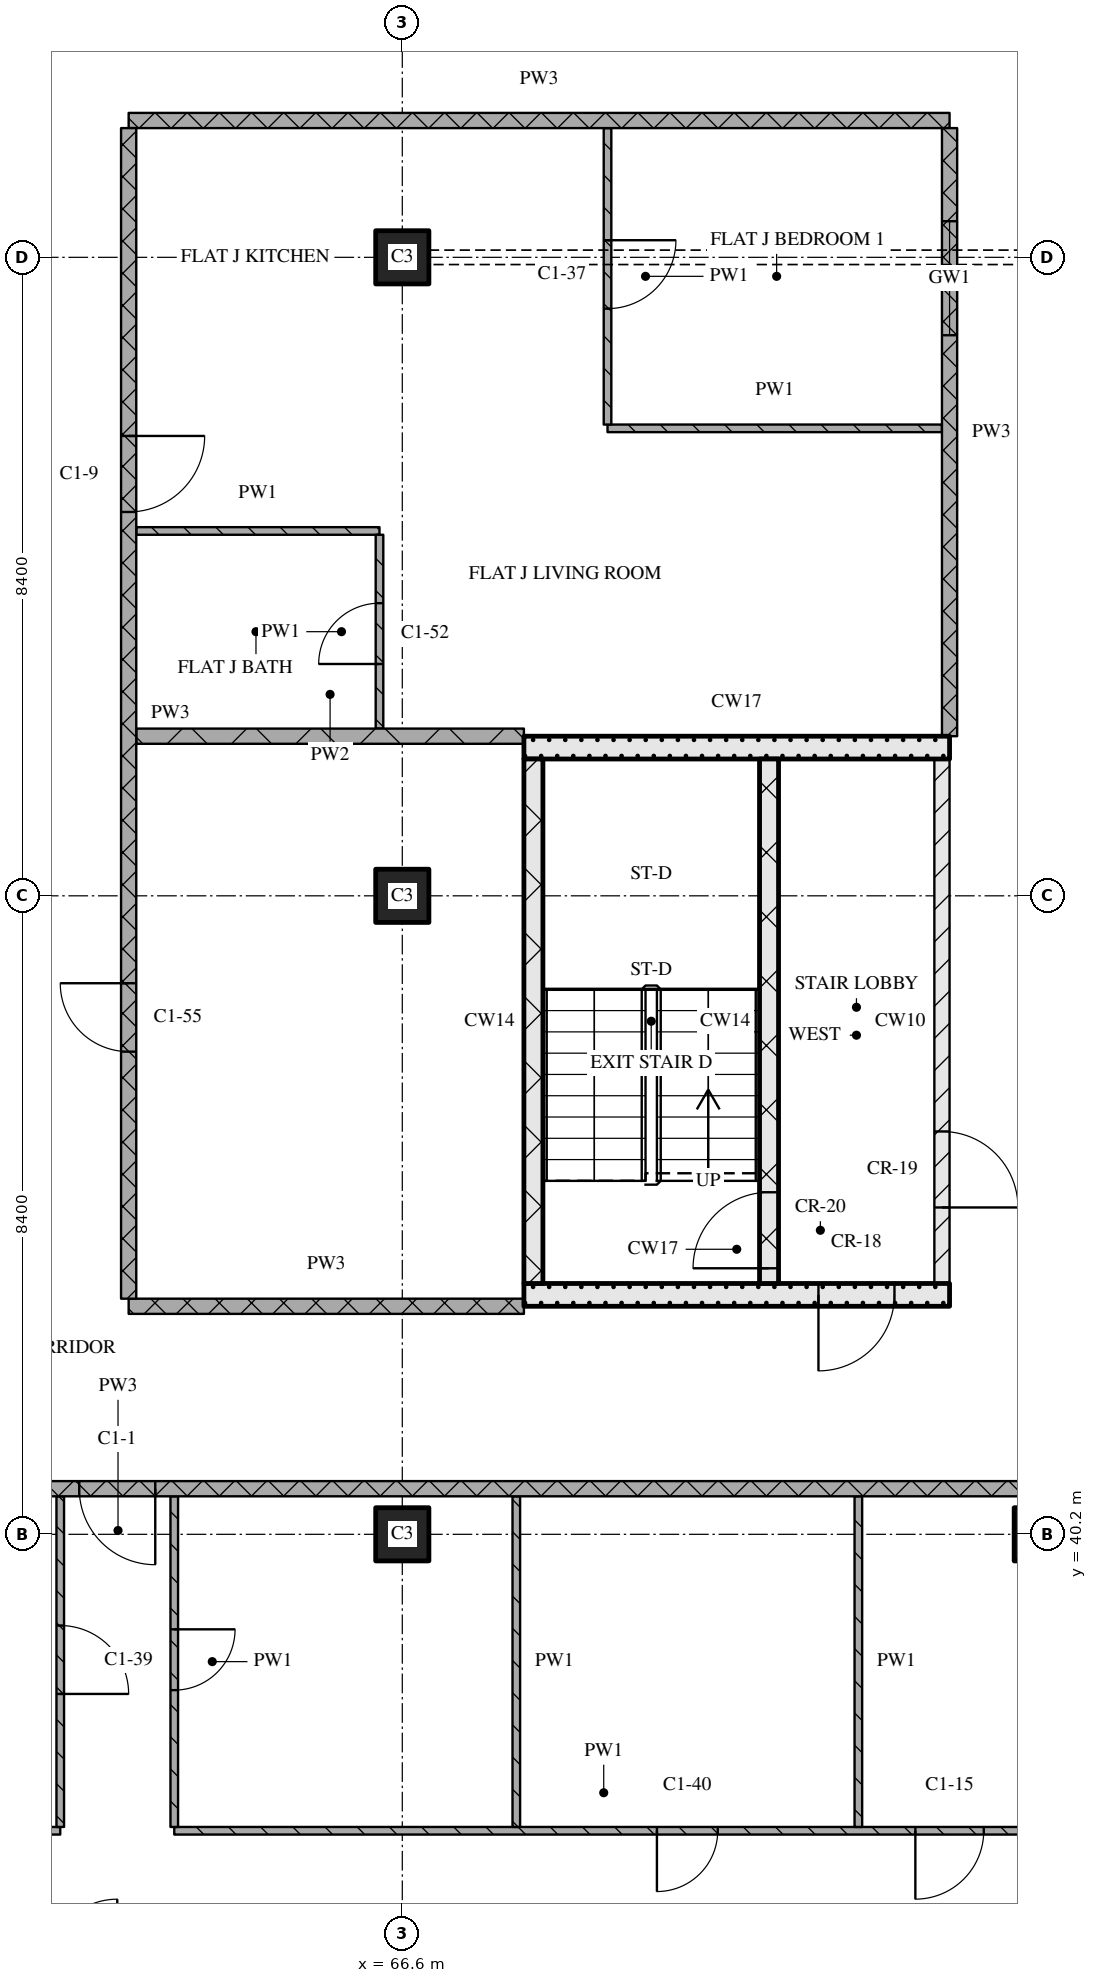
"""IFC4 building model, lengths in metres.
Left out: names, types, materials, properties, quantities, classifications, styles, units other than length and angle.
Written with IfcOpenShell. Run it as: python <this file> out.ifc"""

import sys

from ifc_helpers import new_model, si_unit, direction, frame, frame_2d, origin, origin_2d, place, context, subcontext, project, spatial, rectangle, extrude, element, fill, save


model = new_model("IFC4")
c1 = context("Model", 3, precision=1e-05, world=origin(), true_north=direction((0.0, 1.0)))
c2 = subcontext(c1, "Body", "Model", "MODEL_VIEW")
j1 = project(units=[si_unit("LENGTHUNIT", "METRE"), si_unit("PLANEANGLEUNIT", "RADIAN")], contexts=[c1])
p1 = place(None, origin())
s1 = spatial("IfcSite", under=j1, at=p1, CompositionType="ELEMENT")
p2 = place(p1, origin())
s2 = spatial("IfcBuilding", under=s1, at=p2, CompositionType="ELEMENT")
p3 = place(p2, frame((0.0, 0.0, 147.45)))
s3 = spatial("IfcBuildingStorey", under=s2, at=p3, CompositionType="ELEMENT", Elevation=147.45)
for number, where, z_axis, x_axis in (
    (1, (66.6, 40.2, 0.0), (0.0, 0.0, 1.0), (1.0, 0.0, 0.0)),
    (2, (66.6, 48.6, 0.0), (0.0, 0.0, 1.0), (1.0, 0.0, 0.0)),
    (3, (66.6, 57.0, 0.0), (0.0, 0.0, 1.0), (1.0, 0.0, 0.0)),
    (4, (75.0, 40.2, 0.0), (0.0, 0.0, 1.0), (1.0, 0.0, 0.0)),
):
    element("IfcColumn", number, at=place(p3, frame(where, z_axis=z_axis, x_axis=x_axis)), inside=s3, PredefinedType="COLUMN", context=c2, shape_type="SweptSolid", body=[
        extrude(rectangle(XDim=0.7, YDim=0.7, at=origin_2d()), origin(), (0.0, 0.0, 1.0), 3.6),
    ])
p4 = place(p3, frame((68.2, 43.35, 0.0), z_axis=(0.0, 0.0, 1.0), x_axis=(1.0, 0.0, 0.0)))
e5 = element("IfcWall", 5, at=p4, inside=s3, PredefinedType="SOLIDWALL", context=c2, shape_type="SweptSolid", body=[
    extrude(rectangle(XDim=5.6, YDim=0.3, at=frame_2d((2.8, 0.0))), origin(), (0.0, 0.0, 1.0), 3.32),
])
p5 = place(p4, frame((3.875, 0.0, 0.0)))
e6 = element("IfcOpeningElement", 6, at=p5, cuts=e5, PredefinedType="OPENING", context=c2, shape_type="SweptSolid", body=[
    extrude(rectangle(XDim=1.0, YDim=2.1, at=frame_2d((0.5, 1.05))), frame((0.0, 0.16, 0.0), z_axis=(0.0, -1.0, 0.0), x_axis=(1.0, 0.0, 0.0)), (0.0, 0.0, 1.0), 0.32),
])
p6 = place(p3, frame((68.325, 43.5, 0.0), z_axis=(0.0, 0.0, 1.0), x_axis=(0.0, 1.0, 0.0)))
e7 = element("IfcWall", 7, at=p6, inside=s3, PredefinedType="SOLIDWALL", context=c2, shape_type="SweptSolid", body=[
    extrude(rectangle(XDim=6.9, YDim=0.25, at=frame_2d((3.45, 0.0))), origin(), (0.0, 0.0, 1.0), 3.32),
])
p7 = place(p3, frame((71.425, 43.5, 0.0), z_axis=(0.0, 0.0, 1.0), x_axis=(0.0, 1.0, 0.0)))
e8 = element("IfcWall", 8, at=p7, inside=s3, PredefinedType="SOLIDWALL", context=c2, shape_type="SweptSolid", body=[
    extrude(rectangle(XDim=6.9, YDim=0.25, at=frame_2d((3.45, 0.0))), origin(), (0.0, 0.0, 1.0), 3.32),
])
p8 = place(p7, frame((0.2, 0.0, 0.0)))
e9 = element("IfcOpeningElement", 9, at=p8, cuts=e8, PredefinedType="OPENING", context=c2, shape_type="SweptSolid", body=[
    extrude(rectangle(XDim=1.0, YDim=2.1, at=frame_2d((0.5, 1.05))), frame((0.0, 0.135, 0.0), z_axis=(0.0, -1.0, 0.0), x_axis=(1.0, 0.0, 0.0)), (0.0, 0.0, 1.0), 0.27),
])
p9 = place(p3, frame((73.7, 43.5, 0.0), z_axis=(0.0, 0.0, 1.0), x_axis=(0.0, 1.0, 0.0)))
e10 = element("IfcWall", 10, at=p9, inside=s3, PredefinedType="PARTITIONING", context=c2, shape_type="SweptSolid", body=[
    extrude(rectangle(XDim=6.9, YDim=0.2, at=frame_2d((3.45, 0.0))), origin(), (0.0, 0.0, 1.0), 3.32),
])
p10 = place(p9, frame((1.0, 0.0, 0.0)))
e11 = element("IfcOpeningElement", 11, at=p10, cuts=e10, PredefinedType="OPENING", context=c2, shape_type="SweptSolid", body=[
    extrude(rectangle(XDim=1.0, YDim=2.1, at=frame_2d((0.5, 1.05))), frame((0.0, 0.11, 0.0), z_axis=(0.0, -1.0, 0.0), x_axis=(1.0, 0.0, 0.0)), (0.0, 0.0, 1.0), 0.22),
])
p11 = place(p3, frame((68.2, 50.55, 0.0), z_axis=(0.0, 0.0, 1.0), x_axis=(1.0, 0.0, 0.0)))
e12 = element("IfcWall", 12, at=p11, inside=s3, PredefinedType="SOLIDWALL", context=c2, shape_type="SweptSolid", body=[
    extrude(rectangle(XDim=5.6, YDim=0.3, at=frame_2d((2.8, 0.0))), origin(), (0.0, 0.0, 1.0), 3.32),
])
p12 = place(p3, frame((55.5, 36.3, 0.0), z_axis=(0.0, 0.0, 1.0), x_axis=(1.0, 0.0, 0.0)))
e13 = element("IfcWall", 13, at=p12, inside=s3, PredefinedType="PARTITIONING", context=c2, shape_type="SweptSolid", body=[
    extrude(rectangle(XDim=6.6, YDim=0.1, at=frame_2d((3.3, 0.0))), origin(), (0.0, 0.0, 1.0), 3.32),
])
p13 = place(p3, frame((63.6, 36.3, 0.0), z_axis=(0.0, 0.0, 1.0), x_axis=(1.0, 0.0, 0.0)))
e14 = element("IfcWall", 14, at=p13, inside=s3, PredefinedType="PARTITIONING", context=c2, shape_type="SweptSolid", body=[
    extrude(rectangle(XDim=11.3, YDim=0.1, at=frame_2d((5.65, 0.0))), origin(), (0.0, 0.0, 1.0), 3.32),
])
p14 = place(p13, frame((6.35, 0.0, 0.0)))
e15 = element("IfcOpeningElement", 15, at=p14, cuts=e14, PredefinedType="OPENING", context=c2, shape_type="SweptSolid", body=[
    extrude(rectangle(XDim=0.8, YDim=2.1, at=frame_2d((0.4, 1.05))), frame((0.0, 0.06, 0.0), z_axis=(0.0, -1.0, 0.0), x_axis=(1.0, 0.0, 0.0)), (0.0, 0.0, 1.0), 0.12),
])
p15 = place(p13, frame((9.75, 0.0, 0.0)))
e16 = element("IfcOpeningElement", 16, at=p15, cuts=e14, PredefinedType="OPENING", context=c2, shape_type="SweptSolid", body=[
    extrude(rectangle(XDim=0.9, YDim=2.1, at=frame_2d((0.45, 1.05))), frame((0.0, 0.06, 0.0), z_axis=(0.0, -1.0, 0.0), x_axis=(1.0, 0.0, 0.0)), (0.0, 0.0, 1.0), 0.12),
])
p16 = place(p3, frame((75.0, 40.8, 0.0), z_axis=(0.0, 0.0, 1.0), x_axis=(-1.0, 0.0, 0.0)))
e17 = element("IfcWall", 17, at=p16, inside=s3, PredefinedType="PARTITIONING", context=c2, shape_type="SweptSolid", body=[
    extrude(rectangle(XDim=24.28, YDim=0.2, at=frame_2d((12.14, 0.0))), origin(), (0.0, 0.0, 1.0), 3.32),
])
p17 = place(p16, frame((11.65, 0.0, 0.0)))
e18 = element("IfcOpeningElement", 18, at=p17, cuts=e17, PredefinedType="OPENING", context=c2, shape_type="SweptSolid", body=[
    extrude(rectangle(XDim=1.0, YDim=2.1, at=frame_2d((0.5, 1.05))), frame((0.0, 0.11, 0.0), z_axis=(0.0, -1.0, 0.0), x_axis=(1.0, 0.0, 0.0)), (0.0, 0.0, 1.0), 0.22),
])
p18 = place(p3, frame((63.0, 43.2, 0.0), z_axis=(0.0, 0.0, 1.0), x_axis=(1.0, 0.0, 0.0)))
e19 = element("IfcWall", 19, at=p18, inside=s3, PredefinedType="PARTITIONING", context=c2, shape_type="SweptSolid", body=[
    extrude(rectangle(XDim=5.2, YDim=0.2, at=frame_2d((2.6, 0.0))), origin(), (0.0, 0.0, 1.0), 3.32),
])
p19 = place(p3, frame((63.1, 50.7, 0.0), z_axis=(0.0, 0.0, 1.0), x_axis=(1.0, 0.0, 0.0)))
e20 = element("IfcWall", 20, at=p19, inside=s3, PredefinedType="PARTITIONING", context=c2, shape_type="SweptSolid", body=[
    extrude(rectangle(XDim=5.1, YDim=0.2, at=frame_2d((2.55, 0.0))), origin(), (0.0, 0.0, 1.0), 3.32),
])
p20 = place(p3, frame((63.1, 53.4, 0.0), z_axis=(0.0, 0.0, 1.0), x_axis=(1.0, 0.0, 0.0)))
e21 = element("IfcWall", 21, at=p20, inside=s3, PredefinedType="PARTITIONING", context=c2, shape_type="SweptSolid", body=[
    extrude(rectangle(XDim=3.2, YDim=0.1, at=frame_2d((1.6, 0.0))), origin(), (0.0, 0.0, 1.0), 3.32),
])
p21 = place(p3, frame((69.3, 54.75, 0.0), z_axis=(0.0, 0.0, 1.0), x_axis=(1.0, 0.0, 0.0)))
e22 = element("IfcWall", 22, at=p21, inside=s3, PredefinedType="PARTITIONING", context=c2, shape_type="SweptSolid", body=[
    extrude(rectangle(XDim=4.4, YDim=0.1, at=frame_2d((2.2, 0.0))), origin(), (0.0, 0.0, 1.0), 3.32),
])
p22 = place(p3, frame((63.0, 58.8, 0.0), z_axis=(0.0, 0.0, 1.0), x_axis=(1.0, 0.0, 0.0)))
e23 = element("IfcWall", 23, at=p22, inside=s3, PredefinedType="PARTITIONING", context=c2, shape_type="SweptSolid", body=[
    extrude(rectangle(XDim=10.8, YDim=0.2, at=frame_2d((5.4, 0.0))), origin(), (0.0, 0.0, 1.0), 3.32),
])
p23 = place(p3, frame((62.1, 36.35, 0.0), z_axis=(0.0, 0.0, 1.0), x_axis=(0.0, 1.0, 0.0)))
e24 = element("IfcWall", 24, at=p23, inside=s3, PredefinedType="PARTITIONING", context=c2, shape_type="SweptSolid", body=[
    extrude(rectangle(XDim=4.35, YDim=0.1, at=frame_2d((2.175, 0.0))), origin(), (0.0, 0.0, 1.0), 3.32),
])
p24 = place(p23, frame((1.75, 0.0, 0.0)))
e25 = element("IfcOpeningElement", 25, at=p24, cuts=e24, PredefinedType="OPENING", context=c2, shape_type="SweptSolid", body=[
    extrude(rectangle(XDim=0.9, YDim=2.1, at=frame_2d((0.45, 1.05))), frame((0.0, 0.06, 0.0), z_axis=(0.0, -1.0, 0.0), x_axis=(1.0, 0.0, 0.0)), (0.0, 0.0, 1.0), 0.12),
])
p25 = place(p3, frame((63.0, 58.7, 0.0), z_axis=(0.0, 0.0, 1.0), x_axis=(0.0, -1.0, 0.0)))
e26 = element("IfcWall", 26, at=p25, inside=s3, PredefinedType="PARTITIONING", context=c2, shape_type="SweptSolid", body=[
    extrude(rectangle(XDim=15.4, YDim=0.2, at=frame_2d((7.7, 0.0))), origin(), (0.0, 0.0, 1.0), 3.32),
])
p26 = place(p25, frame((4.05, 0.0, 0.0)))
e27 = element("IfcOpeningElement", 27, at=p26, cuts=e26, PredefinedType="OPENING", context=c2, shape_type="SweptSolid", body=[
    extrude(rectangle(XDim=1.0, YDim=2.1, at=frame_2d((0.5, 1.05))), frame((0.0, 0.11, 0.0), z_axis=(0.0, -1.0, 0.0), x_axis=(1.0, 0.0, 0.0)), (0.0, 0.0, 1.0), 0.22),
])
p27 = place(p25, frame((11.25, 0.0, 0.0)))
e28 = element("IfcOpeningElement", 28, at=p27, cuts=e26, PredefinedType="OPENING", context=c2, shape_type="SweptSolid", body=[
    extrude(rectangle(XDim=0.9, YDim=2.1, at=frame_2d((0.45, 1.05))), frame((0.0, 0.11, 0.0), z_axis=(0.0, -1.0, 0.0), x_axis=(1.0, 0.0, 0.0)), (0.0, 0.0, 1.0), 0.22),
])
p28 = place(p3, frame((63.6, 40.7, 0.0), z_axis=(0.0, 0.0, 1.0), x_axis=(0.0, -1.0, 0.0)))
e29 = element("IfcWall", 29, at=p28, inside=s3, PredefinedType="PARTITIONING", context=c2, shape_type="SweptSolid", body=[
    extrude(rectangle(XDim=4.35, YDim=0.1, at=frame_2d((2.175, 0.0))), origin(), (0.0, 0.0, 1.0), 3.32),
])
p29 = place(p28, frame((1.75, 0.0, 0.0)))
e30 = element("IfcOpeningElement", 30, at=p29, cuts=e29, PredefinedType="OPENING", context=c2, shape_type="SweptSolid", body=[
    extrude(rectangle(XDim=0.8, YDim=2.1, at=frame_2d((0.4, 1.05))), frame((0.0, 0.06, 0.0), z_axis=(0.0, -1.0, 0.0), x_axis=(1.0, 0.0, 0.0)), (0.0, 0.0, 1.0), 0.12),
])
p30 = place(p3, frame((66.3, 50.8, 0.0), z_axis=(0.0, 0.0, 1.0), x_axis=(0.0, 1.0, 0.0)))
e31 = element("IfcWall", 31, at=p30, inside=s3, PredefinedType="PARTITIONING", context=c2, shape_type="SweptSolid", body=[
    extrude(rectangle(XDim=2.55, YDim=0.1, at=frame_2d((1.275, 0.0))), origin(), (0.0, 0.0, 1.0), 3.32),
])
p31 = place(p30, frame((0.85, 0.0, 0.0)))
e32 = element("IfcOpeningElement", 32, at=p31, cuts=e31, PredefinedType="OPENING", context=c2, shape_type="SweptSolid", body=[
    extrude(rectangle(XDim=0.8, YDim=2.1, at=frame_2d((0.4, 1.05))), frame((0.0, 0.06, 0.0), z_axis=(0.0, -1.0, 0.0), x_axis=(1.0, 0.0, 0.0)), (0.0, 0.0, 1.0), 0.12),
])
p32 = place(p3, frame((68.1, 40.7, 0.0), z_axis=(0.0, 0.0, 1.0), x_axis=(0.0, -1.0, 0.0)))
e33 = element("IfcWall", 33, at=p32, inside=s3, PredefinedType="PARTITIONING", context=c2, shape_type="SweptSolid", body=[
    extrude(rectangle(XDim=4.35, YDim=0.1, at=frame_2d((2.175, 0.0))), origin(), (0.0, 0.0, 1.0), 3.32),
])
p33 = place(p3, frame((69.3, 58.7, 0.0), z_axis=(0.0, 0.0, 1.0), x_axis=(0.0, -1.0, 0.0)))
e34 = element("IfcWall", 34, at=p33, inside=s3, PredefinedType="PARTITIONING", context=c2, shape_type="SweptSolid", body=[
    extrude(rectangle(XDim=3.9, YDim=0.1, at=frame_2d((1.95, 0.0))), origin(), (0.0, 0.0, 1.0), 3.32),
])
p34 = place(p33, frame((1.475, 0.0, 0.0)))
e35 = element("IfcOpeningElement", 35, at=p34, cuts=e34, PredefinedType="OPENING", context=c2, shape_type="SweptSolid", body=[
    extrude(rectangle(XDim=0.9, YDim=2.1, at=frame_2d((0.45, 1.05))), frame((0.0, 0.06, 0.0), z_axis=(0.0, -1.0, 0.0), x_axis=(1.0, 0.0, 0.0)), (0.0, 0.0, 1.0), 0.12),
])
p35 = place(p3, frame((72.6, 40.7, 0.0), z_axis=(0.0, 0.0, 1.0), x_axis=(0.0, -1.0, 0.0)))
e36 = element("IfcWall", 36, at=p35, inside=s3, PredefinedType="PARTITIONING", context=c2, shape_type="SweptSolid", body=[
    extrude(rectangle(XDim=4.35, YDim=0.1, at=frame_2d((2.175, 0.0))), origin(), (0.0, 0.0, 1.0), 3.32),
])
p36 = place(p3, frame((73.8, 58.7, 0.0), z_axis=(0.0, 0.0, 1.0), x_axis=(0.0, -1.0, 0.0)))
e37 = element("IfcWall", 37, at=p36, inside=s3, PredefinedType="PARTITIONING", context=c2, shape_type="SweptSolid", body=[
    extrude(rectangle(XDim=8.0, YDim=0.2, at=frame_2d((4.0, 0.0))), origin(), (0.0, 0.0, 1.0), 3.32),
])
p37 = place(p36, frame((1.225, 0.0, 0.9)))
e38 = element("IfcOpeningElement", 38, at=p37, cuts=e37, PredefinedType="OPENING", context=c2, shape_type="SweptSolid", body=[
    extrude(rectangle(XDim=1.5, YDim=1.5, at=frame_2d((0.75, 0.75))), frame((0.0, 0.11, 0.0), z_axis=(0.0, -1.0, 0.0), x_axis=(1.0, 0.0, 0.0)), (0.0, 0.0, 1.0), 0.22),
])
p38 = place(p5, origin())
e39 = element("IfcDoor", 39, at=p38, inside=s3, OperationType="SINGLE_SWING_RIGHT", PredefinedType="DOOR", context=c2, shape_type="SweptSolid", body=[
    extrude(rectangle(XDim=1.0, YDim=2.1, at=frame_2d((0.5, 1.05))), frame((0.0, 0.025, 0.0), z_axis=(0.0, -1.0, 0.0), x_axis=(1.0, 0.0, 0.0)), (0.0, 0.0, 1.0), 0.05),
])
fill(e6, e39)
p39 = place(p8, origin())
e40 = element("IfcDoor", 40, at=p39, inside=s3, OperationType="SINGLE_SWING_LEFT", PredefinedType="DOOR", context=c2, shape_type="SweptSolid", body=[
    extrude(rectangle(XDim=1.0, YDim=2.1, at=frame_2d((0.5, 1.05))), frame((0.0, 0.025, 0.0), z_axis=(0.0, -1.0, 0.0), x_axis=(1.0, 0.0, 0.0)), (0.0, 0.0, 1.0), 0.05),
])
fill(e9, e40)
p40 = place(p10, origin())
e41 = element("IfcDoor", 41, at=p40, inside=s3, OperationType="SINGLE_SWING_RIGHT", PredefinedType="DOOR", context=c2, shape_type="SweptSolid", body=[
    extrude(rectangle(XDim=1.0, YDim=2.1, at=frame_2d((0.5, 1.05))), frame((0.0, 0.025, 0.0), z_axis=(0.0, -1.0, 0.0), x_axis=(1.0, 0.0, 0.0)), (0.0, 0.0, 1.0), 0.05),
])
fill(e11, e41)
p41 = place(p14, origin())
e42 = element("IfcDoor", 42, at=p41, inside=s3, OperationType="SINGLE_SWING_RIGHT", PredefinedType="DOOR", context=c2, shape_type="SweptSolid", body=[
    extrude(rectangle(XDim=0.8, YDim=2.1, at=frame_2d((0.4, 1.05))), frame((0.0, 0.025, 0.0), z_axis=(0.0, -1.0, 0.0), x_axis=(1.0, 0.0, 0.0)), (0.0, 0.0, 1.0), 0.05),
])
fill(e15, e42)
p42 = place(p15, origin())
e43 = element("IfcDoor", 43, at=p42, inside=s3, OperationType="SINGLE_SWING_RIGHT", PredefinedType="DOOR", context=c2, shape_type="SweptSolid", body=[
    extrude(rectangle(XDim=0.9, YDim=2.1, at=frame_2d((0.45, 1.05))), frame((0.0, 0.025, 0.0), z_axis=(0.0, -1.0, 0.0), x_axis=(1.0, 0.0, 0.0)), (0.0, 0.0, 1.0), 0.05),
])
fill(e16, e43)
p43 = place(p17, origin())
e44 = element("IfcDoor", 44, at=p43, inside=s3, OperationType="SINGLE_SWING_LEFT", PredefinedType="DOOR", context=c2, shape_type="SweptSolid", body=[
    extrude(rectangle(XDim=1.0, YDim=2.1, at=frame_2d((0.5, 1.05))), frame((0.0, 0.025, 0.0), z_axis=(0.0, -1.0, 0.0), x_axis=(1.0, 0.0, 0.0)), (0.0, 0.0, 1.0), 0.05),
])
fill(e18, e44)
p44 = place(p24, origin())
e45 = element("IfcDoor", 45, at=p44, inside=s3, OperationType="SINGLE_SWING_RIGHT", PredefinedType="DOOR", context=c2, shape_type="SweptSolid", body=[
    extrude(rectangle(XDim=0.9, YDim=2.1, at=frame_2d((0.45, 1.05))), frame((0.0, 0.025, 0.0), z_axis=(0.0, -1.0, 0.0), x_axis=(1.0, 0.0, 0.0)), (0.0, 0.0, 1.0), 0.05),
])
fill(e25, e45)
p45 = place(p26, origin())
e46 = element("IfcDoor", 46, at=p45, inside=s3, OperationType="SINGLE_SWING_LEFT", PredefinedType="DOOR", context=c2, shape_type="SweptSolid", body=[
    extrude(rectangle(XDim=1.0, YDim=2.1, at=frame_2d((0.5, 1.05))), frame((0.0, 0.025, 0.0), z_axis=(0.0, -1.0, 0.0), x_axis=(1.0, 0.0, 0.0)), (0.0, 0.0, 1.0), 0.05),
])
fill(e27, e46)
p46 = place(p27, origin())
e47 = element("IfcDoor", 47, at=p46, inside=s3, OperationType="SINGLE_SWING_RIGHT", PredefinedType="DOOR", context=c2, shape_type="SweptSolid", body=[
    extrude(rectangle(XDim=0.9, YDim=2.1, at=frame_2d((0.45, 1.05))), frame((0.0, 0.025, 0.0), z_axis=(0.0, -1.0, 0.0), x_axis=(1.0, 0.0, 0.0)), (0.0, 0.0, 1.0), 0.05),
])
fill(e28, e47)
p47 = place(p29, origin())
e48 = element("IfcDoor", 48, at=p47, inside=s3, OperationType="SINGLE_SWING_LEFT", PredefinedType="DOOR", context=c2, shape_type="SweptSolid", body=[
    extrude(rectangle(XDim=0.8, YDim=2.1, at=frame_2d((0.4, 1.05))), frame((0.0, 0.025, 0.0), z_axis=(0.0, -1.0, 0.0), x_axis=(1.0, 0.0, 0.0)), (0.0, 0.0, 1.0), 0.05),
])
fill(e30, e48)
p48 = place(p31, origin())
e49 = element("IfcDoor", 49, at=p48, inside=s3, OperationType="SINGLE_SWING_LEFT", PredefinedType="DOOR", context=c2, shape_type="SweptSolid", body=[
    extrude(rectangle(XDim=0.8, YDim=2.1, at=frame_2d((0.4, 1.05))), frame((0.0, 0.025, 0.0), z_axis=(0.0, -1.0, 0.0), x_axis=(1.0, 0.0, 0.0)), (0.0, 0.0, 1.0), 0.05),
])
fill(e32, e49)
p49 = place(p34, origin())
e50 = element("IfcDoor", 50, at=p49, inside=s3, OperationType="SINGLE_SWING_LEFT", PredefinedType="DOOR", context=c2, shape_type="SweptSolid", body=[
    extrude(rectangle(XDim=0.9, YDim=2.1, at=frame_2d((0.45, 1.05))), frame((0.0, 0.025, 0.0), z_axis=(0.0, -1.0, 0.0), x_axis=(1.0, 0.0, 0.0)), (0.0, 0.0, 1.0), 0.05),
])
fill(e35, e50)
p50 = place(p37, origin())
e51 = element("IfcWindow", 51, at=p50, inside=s3, PartitioningType="SINGLE_PANEL", PredefinedType="WINDOW", context=c2, shape_type="SweptSolid", body=[
    extrude(rectangle(XDim=1.5, YDim=1.5, at=frame_2d((0.75, 0.75))), frame((0.0, 0.03, 0.0), z_axis=(0.0, -1.0, 0.0), x_axis=(1.0, 0.0, 0.0)), (0.0, 0.0, 1.0), 0.06),
])
fill(e38, e51)
save(model, sys.argv[1])
